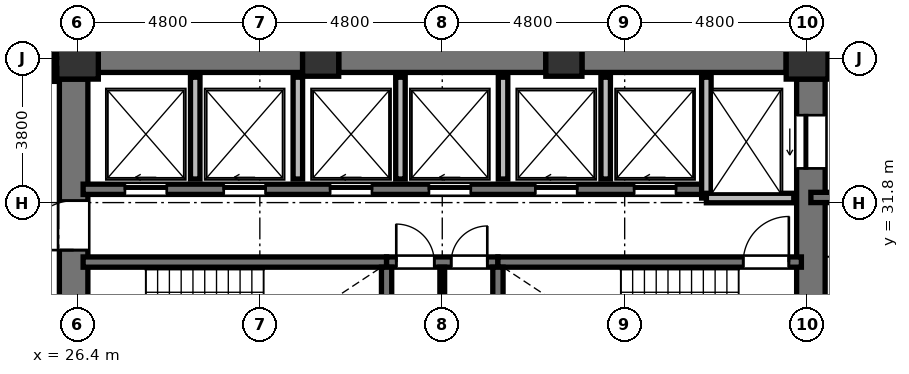
"""IFC4 building model, lengths in metres.
Left out: names, types, materials, properties, quantities, classifications, styles, units other than length and angle.
Written with IfcOpenShell. Run it as: python <this file> out.ifc"""

import sys

from ifc_helpers import new_model, si_unit, direction, frame, frame_2d, origin, origin_2d, place, context, subcontext, project, spatial, rectangle, extrude, element, fill, save


model = new_model("IFC4")
c1 = context("Model", 3, precision=1e-05, world=origin(), true_north=direction((0.0, 1.0)))
c2 = subcontext(c1, "Body", "Model", "MODEL_VIEW")
j1 = project(units=[si_unit("LENGTHUNIT", "METRE"), si_unit("PLANEANGLEUNIT", "RADIAN")], contexts=[c1])
p1 = place(None, origin())
s1 = spatial("IfcSite", under=j1, at=p1, CompositionType="ELEMENT")
p2 = place(p1, origin())
s2 = spatial("IfcBuilding", under=s1, at=p2, CompositionType="ELEMENT")
p3 = place(p2, frame((0.0, 0.0, 92.688)))
s3 = spatial("IfcBuildingStorey", under=s2, at=p3, CompositionType="ELEMENT", Elevation=92.688)
p4 = place(p3, frame((45.6, 35.6, 0.0), z_axis=(0.0, 0.0, 1.0), x_axis=(1.0, 0.0, 0.0)))
e1 = element("IfcColumn", 1, at=p4, inside=s3, PredefinedType="COLUMN", context=c2, shape_type="SweptSolid", body=[
    extrude(rectangle(XDim=1.1, YDim=1.1, at=origin_2d()), origin(), (0.0, 0.0, 1.0), 3.648),
])
for number, where, z_axis, x_axis in (
    (2, (39.2, 35.6, 0.0), (0.0, 0.0, 1.0), (1.0, 0.0, 0.0)),
    (3, (32.8, 35.6, 0.0), (0.0, 0.0, 1.0), (1.0, 0.0, 0.0)),
):
    element("IfcColumn", number, at=place(p3, frame(where, z_axis=z_axis, x_axis=x_axis)), inside=s3, PredefinedType="COLUMN", context=c2, shape_type="SweptSolid", body=[
        extrude(rectangle(XDim=0.95, YDim=0.95, at=origin_2d()), origin(), (0.0, 0.0, 1.0), 3.648),
    ])
p5 = place(p3, frame((26.4, 35.6, 0.0), z_axis=(0.0, 0.0, 1.0), x_axis=(1.0, 0.0, 0.0)))
e4 = element("IfcColumn", 4, at=p5, inside=s3, PredefinedType="COLUMN", context=c2, shape_type="SweptSolid", body=[
    extrude(rectangle(XDim=1.1, YDim=1.1, at=origin_2d()), origin(), (0.0, 0.0, 1.0), 3.648),
])
p6 = place(p3, frame((26.3, 20.95, 0.0), z_axis=(0.0, 0.0, 1.0), x_axis=(0.0, 1.0, 0.0)))
e5 = element("IfcWall", 5, at=p6, inside=s3, PredefinedType="SHEAR", context=c2, shape_type="SweptSolid", body=[
    extrude(rectangle(XDim=14.1, YDim=0.75, at=frame_2d((7.05, 0.0))), origin(), (0.0, 0.0, 1.0), 3.648),
])
p7 = place(p6, frame((6.5, 0.0, 0.0)))
e6 = element("IfcOpeningElement", 6, at=p7, cuts=e5, PredefinedType="OPENING", context=c2, shape_type="SweptSolid", body=[
    extrude(rectangle(XDim=1.2, YDim=2.15, at=frame_2d((0.6, 1.075))), frame((0.0, 0.385, 0.0), z_axis=(0.0, -1.0, 0.0), x_axis=(1.0, 0.0, 0.0)), (0.0, 0.0, 1.0), 0.77),
])
p8 = place(p6, frame((9.6, 0.0, 0.0)))
e7 = element("IfcOpeningElement", 7, at=p8, cuts=e5, PredefinedType="OPENING", context=c2, shape_type="SweptSolid", body=[
    extrude(rectangle(XDim=1.3, YDim=2.2, at=frame_2d((0.65, 1.1))), frame((0.0, 0.385, 0.0), z_axis=(0.0, -1.0, 0.0), x_axis=(1.0, 0.0, 0.0)), (0.0, 0.0, 1.0), 0.77),
])
p9 = place(p6, frame((3.26, 0.0, 0.0)))
e8 = element("IfcOpeningElement", 8, at=p9, cuts=e5, PredefinedType="OPENING", context=c2, shape_type="SweptSolid", body=[
    extrude(rectangle(XDim=1.3, YDim=2.2, at=frame_2d((0.65, 1.1))), frame((0.0, 0.385, 0.0), z_axis=(0.0, -1.0, 0.0), x_axis=(1.0, 0.0, 0.0)), (0.0, 0.0, 1.0), 0.77),
])
p10 = place(p3, frame((45.7, 20.95, 0.0), z_axis=(0.0, 0.0, 1.0), x_axis=(0.0, 1.0, 0.0)))
e9 = element("IfcWall", 9, at=p10, inside=s3, PredefinedType="SHEAR", context=c2, shape_type="SweptSolid", body=[
    extrude(rectangle(XDim=14.1, YDim=0.75, at=frame_2d((7.05, 0.0))), origin(), (0.0, 0.0, 1.0), 3.648),
])
p11 = place(p10, frame((11.75, 0.0, 0.0)))
e10 = element("IfcOpeningElement", 10, at=p11, cuts=e9, PredefinedType="OPENING", context=c2, shape_type="SweptSolid", body=[
    extrude(rectangle(XDim=1.4, YDim=2.3, at=frame_2d((0.7, 1.15))), frame((0.0, 0.385, 0.0), z_axis=(0.0, -1.0, 0.0), x_axis=(1.0, 0.0, 0.0)), (0.0, 0.0, 1.0), 0.77),
])
p12 = place(p10, frame((0.95, 0.0, 0.0)))
e11 = element("IfcOpeningElement", 11, at=p12, cuts=e9, PredefinedType="OPENING", context=c2, shape_type="SweptSolid", body=[
    extrude(rectangle(XDim=1.4, YDim=2.3, at=frame_2d((0.7, 1.15))), frame((0.0, 0.385, 0.0), z_axis=(0.0, -1.0, 0.0), x_axis=(1.0, 0.0, 0.0)), (0.0, 0.0, 1.0), 0.77),
])
p13 = place(p3, frame((26.95, 35.6, 0.0), z_axis=(0.0, 0.0, 1.0), x_axis=(1.0, 0.0, 0.0)))
e12 = element("IfcWall", 12, at=p13, inside=s3, PredefinedType="SHEAR", context=c2, shape_type="SweptSolid", body=[
    extrude(rectangle(XDim=5.375, YDim=0.75, at=frame_2d((2.688, 0.0))), origin(), (0.0, 0.0, 1.0), 3.648),
])
p14 = place(p3, frame((33.275, 35.6, 0.0), z_axis=(0.0, 0.0, 1.0), x_axis=(1.0, 0.0, 0.0)))
e13 = element("IfcWall", 13, at=p14, inside=s3, PredefinedType="SHEAR", context=c2, shape_type="SweptSolid", body=[
    extrude(rectangle(XDim=5.45, YDim=0.75, at=frame_2d((2.725, 0.0))), origin(), (0.0, 0.0, 1.0), 3.648),
])
p15 = place(p3, frame((39.675, 35.6, 0.0), z_axis=(0.0, 0.0, 1.0), x_axis=(1.0, 0.0, 0.0)))
e14 = element("IfcWall", 14, at=p15, inside=s3, PredefinedType="SHEAR", context=c2, shape_type="SweptSolid", body=[
    extrude(rectangle(XDim=5.375, YDim=0.75, at=frame_2d((2.688, 0.0))), origin(), (0.0, 0.0, 1.0), 3.648),
])
p16 = place(p3, frame((26.55, 30.235, 0.0), z_axis=(0.0, 0.0, 1.0), x_axis=(1.0, 0.0, 0.0)))
e15 = element("IfcWall", 15, at=p16, inside=s3, PredefinedType="SHEAR", context=c2, shape_type="SweptSolid", body=[
    extrude(rectangle(XDim=7.985, YDim=0.27, at=frame_2d((3.992, 0.0))), origin(), (0.0, 0.0, 1.0), 3.648),
])
p17 = place(p3, frame((34.535, 30.235, 0.0), z_axis=(0.0, 0.0, 1.0), x_axis=(1.0, 0.0, 0.0)))
e16 = element("IfcWall", 16, at=p17, inside=s3, PredefinedType="SHEAR", context=c2, shape_type="SweptSolid", body=[
    extrude(rectangle(XDim=2.93, YDim=0.27, at=frame_2d((1.465, 0.0))), origin(), (0.0, 0.0, 1.0), 3.648),
])
p18 = place(p17, frame((0.255, 0.0, 0.0)))
e17 = element("IfcOpeningElement", 17, at=p18, cuts=e16, PredefinedType="OPENING", context=c2, shape_type="SweptSolid", body=[
    extrude(rectangle(XDim=1.0, YDim=2.1, at=frame_2d((0.5, 1.05))), frame((0.0, 0.145, 0.0), z_axis=(0.0, -1.0, 0.0), x_axis=(1.0, 0.0, 0.0)), (0.0, 0.0, 1.0), 0.29),
])
p19 = place(p17, frame((1.7, 0.0, 0.0)))
e18 = element("IfcOpeningElement", 18, at=p19, cuts=e16, PredefinedType="OPENING", context=c2, shape_type="SweptSolid", body=[
    extrude(rectangle(XDim=0.95, YDim=2.1, at=frame_2d((0.475, 1.05))), frame((0.0, 0.145, 0.0), z_axis=(0.0, -1.0, 0.0), x_axis=(1.0, 0.0, 0.0)), (0.0, 0.0, 1.0), 0.29),
])
p20 = place(p3, frame((37.465, 30.235, 0.0), z_axis=(0.0, 0.0, 1.0), x_axis=(1.0, 0.0, 0.0)))
e19 = element("IfcWall", 19, at=p20, inside=s3, PredefinedType="SHEAR", context=c2, shape_type="SweptSolid", body=[
    extrude(rectangle(XDim=7.985, YDim=0.27, at=frame_2d((3.992, 0.0))), origin(), (0.0, 0.0, 1.0), 3.648),
])
p21 = place(p20, frame((6.455, 0.0, 0.0)))
e20 = element("IfcOpeningElement", 20, at=p21, cuts=e19, PredefinedType="OPENING", context=c2, shape_type="SweptSolid", body=[
    extrude(rectangle(XDim=1.2, YDim=2.15, at=frame_2d((0.6, 1.075))), frame((0.0, 0.145, 0.0), z_axis=(0.0, -1.0, 0.0), x_axis=(1.0, 0.0, 0.0)), (0.0, 0.0, 1.0), 0.29),
])
for number, where, z_axis, x_axis in (
    (21, (34.535, 26.02, 0.0), (0.0, 0.0, 1.0), (0.0, 1.0, 0.0)),
    (22, (37.465, 26.02, 0.0), (0.0, 0.0, 1.0), (0.0, 1.0, 0.0)),
):
    element("IfcWall", number, at=place(p3, frame(where, z_axis=z_axis, x_axis=x_axis)), inside=s3, PredefinedType="SHEAR", context=c2, shape_type="SweptSolid", body=[
        extrude(rectangle(XDim=4.08, YDim=0.27, at=frame_2d((2.04, 0.0))), origin(), (0.0, 0.0, 1.0), 3.648),
    ])
p22 = place(p3, frame((36.0, 26.02, 0.0), z_axis=(0.0, 0.0, 1.0), x_axis=(0.0, 1.0, 0.0)))
e23 = element("IfcWall", 23, at=p22, inside=s3, PredefinedType="PARTITIONING", context=c2, shape_type="SweptSolid", body=[
    extrude(rectangle(XDim=4.08, YDim=0.125, at=frame_2d((2.04, 0.0))), origin(), (0.0, 0.0, 1.0), 3.428),
])
p23 = place(p3, frame((26.55, 32.15, 0.0), z_axis=(0.0, 0.0, 1.0), x_axis=(1.0, 0.0, 0.0)))
e24 = element("IfcWall", 24, at=p23, inside=s3, PredefinedType="SHEAR", context=c2, shape_type="SweptSolid", body=[
    extrude(rectangle(XDim=16.4, YDim=0.27, at=frame_2d((8.2, 0.0))), origin(), (0.0, 0.0, 1.0), 3.648),
])
p24 = place(p23, frame((1.1, 0.0, 0.0)))
e25 = element("IfcOpeningElement", 25, at=p24, cuts=e24, PredefinedType="OPENING", context=c2, shape_type="SweptSolid", body=[
    extrude(rectangle(XDim=1.1, YDim=2.2, at=frame_2d((0.55, 1.1))), frame((0.0, 0.145, 0.0), z_axis=(0.0, -1.0, 0.0), x_axis=(1.0, 0.0, 0.0)), (0.0, 0.0, 1.0), 0.29),
])
p25 = place(p23, frame((3.7, 0.0, 0.0)))
e26 = element("IfcOpeningElement", 26, at=p25, cuts=e24, PredefinedType="OPENING", context=c2, shape_type="SweptSolid", body=[
    extrude(rectangle(XDim=1.1, YDim=2.2, at=frame_2d((0.55, 1.1))), frame((0.0, 0.145, 0.0), z_axis=(0.0, -1.0, 0.0), x_axis=(1.0, 0.0, 0.0)), (0.0, 0.0, 1.0), 0.29),
])
p26 = place(p23, frame((6.5, 0.0, 0.0)))
e27 = element("IfcOpeningElement", 27, at=p26, cuts=e24, PredefinedType="OPENING", context=c2, shape_type="SweptSolid", body=[
    extrude(rectangle(XDim=1.1, YDim=2.2, at=frame_2d((0.55, 1.1))), frame((0.0, 0.145, 0.0), z_axis=(0.0, -1.0, 0.0), x_axis=(1.0, 0.0, 0.0)), (0.0, 0.0, 1.0), 0.29),
])
p27 = place(p23, frame((9.1, 0.0, 0.0)))
e28 = element("IfcOpeningElement", 28, at=p27, cuts=e24, PredefinedType="OPENING", context=c2, shape_type="SweptSolid", body=[
    extrude(rectangle(XDim=1.1, YDim=2.2, at=frame_2d((0.55, 1.1))), frame((0.0, 0.145, 0.0), z_axis=(0.0, -1.0, 0.0), x_axis=(1.0, 0.0, 0.0)), (0.0, 0.0, 1.0), 0.29),
])
p28 = place(p23, frame((11.9, 0.0, 0.0)))
e29 = element("IfcOpeningElement", 29, at=p28, cuts=e24, PredefinedType="OPENING", context=c2, shape_type="SweptSolid", body=[
    extrude(rectangle(XDim=1.1, YDim=2.2, at=frame_2d((0.55, 1.1))), frame((0.0, 0.145, 0.0), z_axis=(0.0, -1.0, 0.0), x_axis=(1.0, 0.0, 0.0)), (0.0, 0.0, 1.0), 0.29),
])
p29 = place(p23, frame((14.5, 0.0, 0.0)))
e30 = element("IfcOpeningElement", 30, at=p29, cuts=e24, PredefinedType="OPENING", context=c2, shape_type="SweptSolid", body=[
    extrude(rectangle(XDim=1.1, YDim=2.2, at=frame_2d((0.55, 1.1))), frame((0.0, 0.145, 0.0), z_axis=(0.0, -1.0, 0.0), x_axis=(1.0, 0.0, 0.0)), (0.0, 0.0, 1.0), 0.29),
])
p30 = place(p3, frame((42.95, 31.92, 0.0), z_axis=(0.0, 0.0, 1.0), x_axis=(0.0, 1.0, 0.0)))
e31 = element("IfcWall", 31, at=p30, inside=s3, PredefinedType="SOLIDWALL", context=c2, shape_type="SweptSolid", body=[
    extrude(rectangle(XDim=3.18, YDim=0.25, at=frame_2d((1.59, 0.0))), origin(), (0.0, 0.0, 1.0), 3.428),
])
p31 = place(p3, frame((42.95, 31.92, 0.0), z_axis=(0.0, 0.0, 1.0), x_axis=(1.0, 0.0, 0.0)))
e32 = element("IfcWall", 32, at=p31, inside=s3, PredefinedType="SOLIDWALL", context=c2, shape_type="SweptSolid", body=[
    extrude(rectangle(XDim=2.3, YDim=0.25, at=frame_2d((1.15, 0.0))), origin(), (0.0, 0.0, 1.0), 3.428),
])
for number, where, z_axis, x_axis in (
    (33, (29.5, 32.42, 0.0), (0.0, 0.0, 1.0), (0.0, 1.0, 0.0)),
    (34, (32.2, 32.42, 0.0), (0.0, 0.0, 1.0), (0.0, 1.0, 0.0)),
    (35, (34.9, 32.42, 0.0), (0.0, 0.0, 1.0), (0.0, 1.0, 0.0)),
    (36, (37.6, 32.42, 0.0), (0.0, 0.0, 1.0), (0.0, 1.0, 0.0)),
    (37, (40.3, 32.42, 0.0), (0.0, 0.0, 1.0), (0.0, 1.0, 0.0)),
):
    element("IfcWall", number, at=place(p3, frame(where, z_axis=z_axis, x_axis=x_axis)), inside=s3, PredefinedType="SOLIDWALL", context=c2, shape_type="SweptSolid", body=[
        extrude(rectangle(XDim=2.68, YDim=0.25, at=frame_2d((1.34, 0.0))), origin(), (0.0, 0.0, 1.0), 3.428),
    ])
p32 = place(p3, frame((45.7, 31.935, 0.0), z_axis=(0.0, 0.0, 1.0), x_axis=(1.0, 0.0, 0.0)))
e38 = element("IfcWall", 38, at=p32, inside=s3, PredefinedType="SHEAR", context=c2, shape_type="SweptSolid", body=[
    extrude(rectangle(XDim=4.715, YDim=0.27, at=frame_2d((2.357, 0.0))), origin(), (0.0, 0.0, 1.0), 3.648),
])
p33 = place(p3, frame((25.83, 36.21, 0.0), z_axis=(0.0, 0.0, 1.0), x_axis=(0.0, -1.0, 0.0)))
e39 = element("IfcWall", 39, at=p33, inside=s3, PredefinedType="PARTITIONING", context=c2, shape_type="SweptSolid", body=[
    extrude(rectangle(XDim=1.22, YDim=0.18, at=frame_2d((0.61, 0.0))), origin(), (0.0, 0.0, 1.0), 3.428),
])
p34 = place(p21, origin())
e40 = element("IfcDoor", 40, at=p34, inside=s3, OperationType="SINGLE_SWING_RIGHT", PredefinedType="DOOR", context=c2, shape_type="SweptSolid", body=[
    extrude(rectangle(XDim=1.2, YDim=2.15, at=frame_2d((0.6, 1.075))), frame((0.0, 0.025, 0.0), z_axis=(0.0, -1.0, 0.0), x_axis=(1.0, 0.0, 0.0)), (0.0, 0.0, 1.0), 0.05),
])
fill(e20, e40)
p35 = place(p18, origin())
e41 = element("IfcDoor", 41, at=p35, inside=s3, OperationType="SINGLE_SWING_LEFT", PredefinedType="DOOR", context=c2, shape_type="SweptSolid", body=[
    extrude(rectangle(XDim=1.0, YDim=2.1, at=frame_2d((0.5, 1.05))), frame((0.0, 0.025, 0.0), z_axis=(0.0, -1.0, 0.0), x_axis=(1.0, 0.0, 0.0)), (0.0, 0.0, 1.0), 0.05),
])
fill(e17, e41)
p36 = place(p19, origin())
e42 = element("IfcDoor", 42, at=p36, inside=s3, OperationType="SINGLE_SWING_RIGHT", PredefinedType="DOOR", context=c2, shape_type="SweptSolid", body=[
    extrude(rectangle(XDim=0.95, YDim=2.1, at=frame_2d((0.475, 1.05))), frame((0.0, 0.025, 0.0), z_axis=(0.0, -1.0, 0.0), x_axis=(1.0, 0.0, 0.0)), (0.0, 0.0, 1.0), 0.05),
])
fill(e18, e42)
p37 = place(p8, origin())
e43 = element("IfcDoor", 43, at=p37, inside=s3, OperationType="SINGLE_SWING_LEFT", PredefinedType="DOOR", context=c2, shape_type="SweptSolid", body=[
    extrude(rectangle(XDim=1.3, YDim=2.2, at=frame_2d((0.65, 1.1))), frame((0.0, 0.025, 0.0), z_axis=(0.0, -1.0, 0.0), x_axis=(1.0, 0.0, 0.0)), (0.0, 0.0, 1.0), 0.05),
])
fill(e7, e43)
p38 = place(p24, origin())
e44 = element("IfcDoor", 44, at=p38, inside=s3, OperationType="SLIDING_TO_LEFT", PredefinedType="DOOR", context=c2, shape_type="SweptSolid", body=[
    extrude(rectangle(XDim=1.1, YDim=2.2, at=frame_2d((0.55, 1.1))), frame((0.0, 0.025, 0.0), z_axis=(0.0, -1.0, 0.0), x_axis=(1.0, 0.0, 0.0)), (0.0, 0.0, 1.0), 0.05),
])
fill(e25, e44)
p39 = place(p25, origin())
e45 = element("IfcDoor", 45, at=p39, inside=s3, OperationType="SLIDING_TO_LEFT", PredefinedType="DOOR", context=c2, shape_type="SweptSolid", body=[
    extrude(rectangle(XDim=1.1, YDim=2.2, at=frame_2d((0.55, 1.1))), frame((0.0, 0.025, 0.0), z_axis=(0.0, -1.0, 0.0), x_axis=(1.0, 0.0, 0.0)), (0.0, 0.0, 1.0), 0.05),
])
fill(e26, e45)
p40 = place(p26, origin())
e46 = element("IfcDoor", 46, at=p40, inside=s3, OperationType="SLIDING_TO_LEFT", PredefinedType="DOOR", context=c2, shape_type="SweptSolid", body=[
    extrude(rectangle(XDim=1.1, YDim=2.2, at=frame_2d((0.55, 1.1))), frame((0.0, 0.025, 0.0), z_axis=(0.0, -1.0, 0.0), x_axis=(1.0, 0.0, 0.0)), (0.0, 0.0, 1.0), 0.05),
])
fill(e27, e46)
p41 = place(p27, origin())
e47 = element("IfcDoor", 47, at=p41, inside=s3, OperationType="SLIDING_TO_LEFT", PredefinedType="DOOR", context=c2, shape_type="SweptSolid", body=[
    extrude(rectangle(XDim=1.1, YDim=2.2, at=frame_2d((0.55, 1.1))), frame((0.0, 0.025, 0.0), z_axis=(0.0, -1.0, 0.0), x_axis=(1.0, 0.0, 0.0)), (0.0, 0.0, 1.0), 0.05),
])
fill(e28, e47)
p42 = place(p28, origin())
e48 = element("IfcDoor", 48, at=p42, inside=s3, OperationType="SLIDING_TO_LEFT", PredefinedType="DOOR", context=c2, shape_type="SweptSolid", body=[
    extrude(rectangle(XDim=1.1, YDim=2.2, at=frame_2d((0.55, 1.1))), frame((0.0, 0.025, 0.0), z_axis=(0.0, -1.0, 0.0), x_axis=(1.0, 0.0, 0.0)), (0.0, 0.0, 1.0), 0.05),
])
fill(e29, e48)
p43 = place(p29, origin())
e49 = element("IfcDoor", 49, at=p43, inside=s3, OperationType="SLIDING_TO_LEFT", PredefinedType="DOOR", context=c2, shape_type="SweptSolid", body=[
    extrude(rectangle(XDim=1.1, YDim=2.2, at=frame_2d((0.55, 1.1))), frame((0.0, 0.025, 0.0), z_axis=(0.0, -1.0, 0.0), x_axis=(1.0, 0.0, 0.0)), (0.0, 0.0, 1.0), 0.05),
])
fill(e30, e49)
p44 = place(p11, origin())
e50 = element("IfcDoor", 50, at=p44, inside=s3, OperationType="SLIDING_TO_LEFT", PredefinedType="DOOR", context=c2, shape_type="SweptSolid", body=[
    extrude(rectangle(XDim=1.4, YDim=2.3, at=frame_2d((0.7, 1.15))), frame((0.0, 0.025, 0.0), z_axis=(0.0, -1.0, 0.0), x_axis=(1.0, 0.0, 0.0)), (0.0, 0.0, 1.0), 0.05),
])
fill(e10, e50)
save(model, sys.argv[1])
